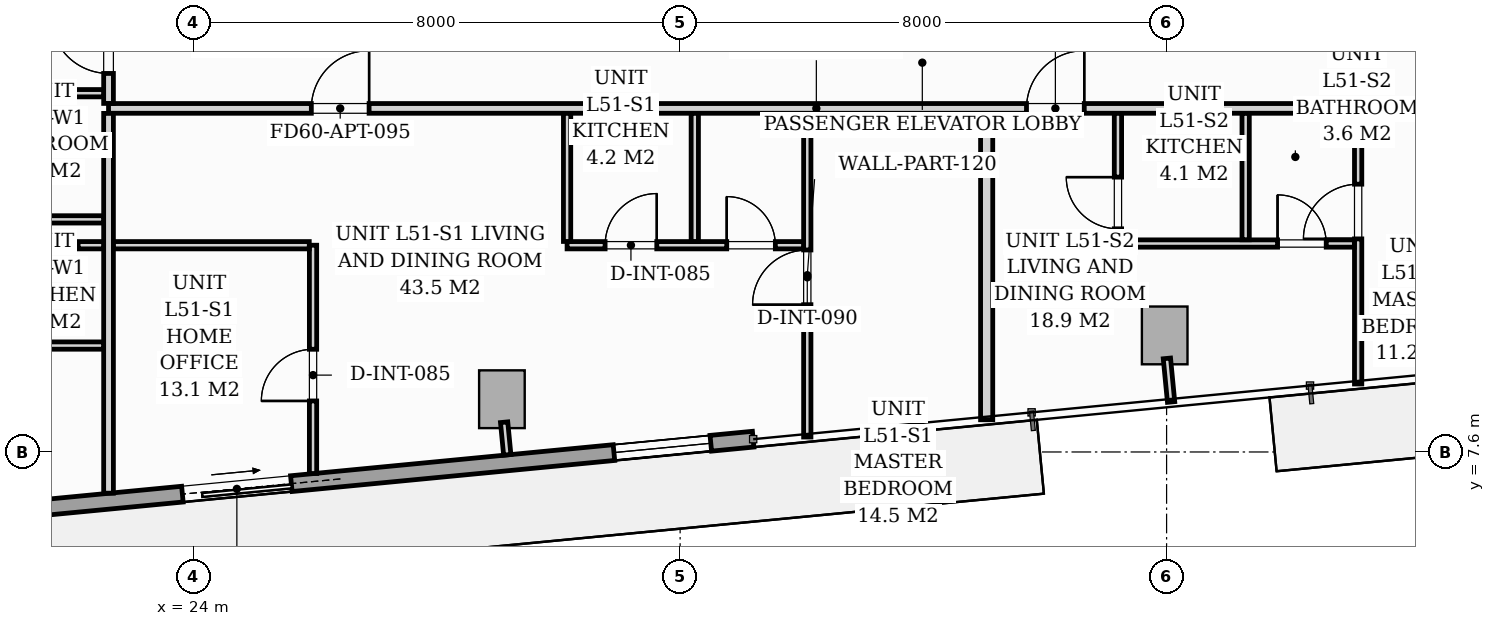
"""IFC4 building model, lengths in metres.
Left out: names, types, materials, properties, quantities, classifications, styles, units other than length and angle.
Written with IfcOpenShell. Run it as: python <this file> out.ifc"""

import sys

from ifc_helpers import new_model, si_unit, direction, frame, frame_2d, origin, origin_2d, place, context, subcontext, project, spatial, rectangle, extrude, source, transform, mapped, element, fill, save


model = new_model("IFC4")
c1 = context("Model", 3, precision=1e-05, world=origin(), true_north=direction((0.0, 1.0)))
c2 = subcontext(c1, "Body", "Model", "MODEL_VIEW")
j1 = project(units=[si_unit("LENGTHUNIT", "METRE"), si_unit("PLANEANGLEUNIT", "RADIAN")], contexts=[c1])
p1 = place(None, origin())
s1 = spatial("IfcSite", under=j1, at=p1, CompositionType="ELEMENT")
p2 = place(p1, origin())
s2 = spatial("IfcBuilding", under=s1, at=p2, CompositionType="ELEMENT")
p3 = place(p2, frame((0.0, 0.0, 179.4)))
s3 = spatial("IfcBuildingStorey", under=s2, at=p3, CompositionType="ELEMENT", Elevation=179.4)
m1 = source(origin(), c2, "Body", "SweptSolid", [
    extrude(rectangle(XDim=0.75, YDim=0.95, at=origin_2d()), origin(), (0.0, 0.0, 1.0), 3.196),
])
for number, where, z_axis, x_axis in (
    (1, (29.069, 8.467, 0.002), (0.0, 0.0, 1.0), (0.995, 0.096, 0.0)),
    (2, (39.969, 9.517, 0.002), (0.0, 0.0, 1.0), (0.995, 0.096, 0.0)),
):
    element("IfcColumn", number, at=place(p3, frame(where, z_axis=z_axis, x_axis=x_axis)), inside=s3, PredefinedType="COLUMN", context=c2, shape_type="MappedRepresentation", body=[
        mapped(m1, transform((0.0, 0.0, 0.0), scale=1.0)),
    ])
p4 = place(p3, frame((33.201, 7.81, 0.0), z_axis=(0.0, 0.0, 1.0), x_axis=(-0.995397074604, -0.095836652014, 0.0)))
e3 = element("IfcWall", 3, at=p4, inside=s3, PredefinedType="STANDARD", context=c2, shape_type="SweptSolid", body=[
    extrude(rectangle(XDim=16.1, YDim=0.26, at=frame_2d((8.05, 0.0))), origin(), (0.0, 0.0, 1.0), 2.94),
])
p5 = place(p4, frame((7.63, 0.0, 0.0)))
e4 = element("IfcOpeningElement", 4, at=p5, cuts=e3, PredefinedType="OPENING", context=c2, shape_type="SweptSolid", body=[
    extrude(rectangle(XDim=1.8, YDim=2.06, at=frame_2d((0.9, 1.03))), frame((0.0, 0.14, 0.0), z_axis=(0.0, -1.0, 0.0), x_axis=(1.0, 0.0, 0.0)), (0.0, 0.0, 1.0), 0.28),
])
p6 = place(p4, frame((0.7, 0.0, 0.65)))
e5 = element("IfcOpeningElement", 5, at=p6, cuts=e3, PredefinedType="OPENING", context=c2, shape_type="SweptSolid", body=[
    extrude(rectangle(XDim=1.6, YDim=1.5, at=frame_2d((0.8, 0.75))), frame((0.0, 0.14, 0.0), z_axis=(0.0, -1.0, 0.0), x_axis=(1.0, 0.0, 0.0)), (0.0, 0.0, 1.0), 0.28),
])
p7 = place(p3, frame((22.6, 13.25, 0.0), z_axis=(0.0, 0.0, 1.0), x_axis=(1.0, 0.0, 0.0)))
e6 = element("IfcWall", 6, at=p7, inside=s3, PredefinedType="PARTITIONING", context=c2, shape_type="SweptSolid", body=[
    extrude(rectangle(XDim=23.28, YDim=0.16, at=frame_2d((11.64, 0.0))), origin(), (0.0, 0.0, 1.0), 2.94),
])
p8 = place(p7, frame((3.335, 0.0, 0.0)))
e7 = element("IfcOpeningElement", 7, at=p8, cuts=e6, PredefinedType="OPENING", context=c2, shape_type="SweptSolid", body=[
    extrude(rectangle(XDim=0.95, YDim=2.06, at=frame_2d((0.475, 1.03))), frame((0.0, 0.09, 0.0), z_axis=(0.0, -1.0, 0.0), x_axis=(1.0, 0.0, 0.0)), (0.0, 0.0, 1.0), 0.18),
])
p9 = place(p7, frame((15.096, 0.0, 0.0)))
e8 = element("IfcOpeningElement", 8, at=p9, cuts=e6, PredefinedType="OPENING", context=c2, shape_type="SweptSolid", body=[
    extrude(rectangle(XDim=0.95, YDim=2.06, at=frame_2d((0.475, 1.03))), frame((0.0, 0.09, 0.0), z_axis=(0.0, -1.0, 0.0), x_axis=(1.0, 0.0, 0.0)), (0.0, 0.0, 1.0), 0.18),
])
p10 = place(p3, frame((22.6, 6.922, 0.0), z_axis=(0.0, 0.0, 1.0), x_axis=(0.0, 1.0, 0.0)))
e9 = element("IfcWall", 9, at=p10, inside=s3, PredefinedType="PARTITIONING", context=c2, shape_type="SweptSolid", body=[
    extrude(rectangle(XDim=6.246, YDim=0.16, at=frame_2d((3.123, 0.0))), origin(), (0.0, 0.0, 1.0), 2.94),
])
p11 = place(p3, frame((22.6, 13.332, 0.0), z_axis=(0.0, 0.0, 1.0), x_axis=(0.0, 1.0, 0.0)))
e10 = element("IfcWall", 10, at=p11, inside=s3, PredefinedType="PARTITIONING", context=c2, shape_type="SweptSolid", body=[
    extrude(rectangle(XDim=11.549, YDim=0.16, at=frame_2d((5.774, 0.0))), origin(), (0.0, 0.0, 1.0), 2.94),
])
p12 = place(p11, frame((0.493, 0.0, 0.0)))
e11 = element("IfcOpeningElement", 11, at=p12, cuts=e10, PredefinedType="OPENING", context=c2, shape_type="SweptSolid", body=[
    extrude(rectangle(XDim=0.95, YDim=2.06, at=frame_2d((0.475, 1.03))), frame((0.0, 0.09, 0.0), z_axis=(0.0, -1.0, 0.0), x_axis=(1.0, 0.0, 0.0)), (0.0, 0.0, 1.0), 0.18),
])
p13 = place(p11, frame((4.713, 0.0, 0.0)))
e12 = element("IfcOpeningElement", 12, at=p13, cuts=e10, PredefinedType="OPENING", context=c2, shape_type="SweptSolid", body=[
    extrude(rectangle(XDim=0.95, YDim=2.06, at=frame_2d((0.475, 1.03))), frame((0.0, 0.09, 0.0), z_axis=(0.0, -1.0, 0.0), x_axis=(1.0, 0.0, 0.0)), (0.0, 0.0, 1.0), 0.18),
])
p14 = place(p3, frame((34.091, 7.846, 0.0), z_axis=(0.0, 0.0, 1.0), x_axis=(0.0, 1.0, 0.0)))
e13 = element("IfcWall", 13, at=p14, inside=s3, PredefinedType="PARTITIONING", context=c2, shape_type="SweptSolid", body=[
    extrude(rectangle(XDim=5.322, YDim=0.12, at=frame_2d((2.661, 0.0))), origin(), (0.0, 0.0, 1.0), 2.94),
])
p15 = place(p14, frame((2.176, 0.0, 0.0)))
e14 = element("IfcOpeningElement", 14, at=p15, cuts=e13, PredefinedType="OPENING", context=c2, shape_type="SweptSolid", body=[
    extrude(rectangle(XDim=0.9, YDim=2.05, at=frame_2d((0.45, 1.025))), frame((0.0, 0.07, 0.0), z_axis=(0.0, -1.0, 0.0), x_axis=(1.0, 0.0, 0.0)), (0.0, 0.0, 1.0), 0.14),
])
p16 = place(p3, frame((30.141, 11.0, 0.0), z_axis=(0.0, 0.0, 1.0), x_axis=(1.0, 0.0, 0.0)))
e15 = element("IfcWall", 15, at=p16, inside=s3, PredefinedType="PARTITIONING", context=c2, shape_type="SweptSolid", body=[
    extrude(rectangle(XDim=3.888, YDim=0.12, at=frame_2d((1.944, 0.0))), origin(), (0.0, 0.0, 1.0), 2.94),
])
p17 = place(p16, frame((0.625, 0.0, 0.0)))
e16 = element("IfcOpeningElement", 16, at=p17, cuts=e15, PredefinedType="OPENING", context=c2, shape_type="SweptSolid", body=[
    extrude(rectangle(XDim=0.85, YDim=2.05, at=frame_2d((0.425, 1.025))), frame((0.0, 0.07, 0.0), z_axis=(0.0, -1.0, 0.0), x_axis=(1.0, 0.0, 0.0)), (0.0, 0.0, 1.0), 0.14),
])
p18 = place(p16, frame((2.625, 0.0, 0.0)))
e17 = element("IfcOpeningElement", 17, at=p18, cuts=e15, PredefinedType="OPENING", context=c2, shape_type="SweptSolid", body=[
    extrude(rectangle(XDim=0.8, YDim=2.02, at=frame_2d((0.4, 1.01))), frame((0.0, 0.07, 0.0), z_axis=(0.0, -1.0, 0.0), x_axis=(1.0, 0.0, 0.0)), (0.0, 0.0, 1.0), 0.14),
])
for number, where, z_axis, x_axis in (
    (18, (32.241, 11.062, 0.0), (0.0, 0.0, 1.0), (0.0, 1.0, 0.0)),
    (19, (30.141, 11.062, 0.0), (0.0, 0.0, 1.0), (0.0, 1.0, 0.0)),
):
    element("IfcWall", number, at=place(p3, frame(where, z_axis=z_axis, x_axis=x_axis)), inside=s3, PredefinedType="PARTITIONING", context=c2, shape_type="SweptSolid", body=[
        extrude(rectangle(XDim=2.106, YDim=0.12, at=frame_2d((1.053, 0.0))), origin(), (0.0, 0.0, 1.0), 2.94),
    ])
p19 = place(p3, frame((25.963, 7.246, 0.0), z_axis=(0.0, 0.0, 1.0), x_axis=(0.0, 1.0, 0.0)))
e20 = element("IfcWall", 20, at=p19, inside=s3, PredefinedType="PARTITIONING", context=c2, shape_type="SweptSolid", body=[
    extrude(rectangle(XDim=3.754, YDim=0.12, at=frame_2d((1.877, 0.0))), origin(), (0.0, 0.0, 1.0), 2.94),
])
p20 = place(p19, frame((1.193, 0.0, 0.0)))
e21 = element("IfcOpeningElement", 21, at=p20, cuts=e20, PredefinedType="OPENING", context=c2, shape_type="SweptSolid", body=[
    extrude(rectangle(XDim=0.85, YDim=2.05, at=frame_2d((0.425, 1.025))), frame((0.0, 0.07, 0.0), z_axis=(0.0, -1.0, 0.0), x_axis=(1.0, 0.0, 0.0)), (0.0, 0.0, 1.0), 0.14),
])
p21 = place(p3, frame((22.1, 11.0, 0.0), z_axis=(0.0, 0.0, 1.0), x_axis=(1.0, 0.0, 0.0)))
e22 = element("IfcWall", 22, at=p21, inside=s3, PredefinedType="PARTITIONING", context=c2, shape_type="SweptSolid", body=[
    extrude(rectangle(XDim=0.418, YDim=0.12, at=frame_2d((0.209, 0.0))), origin(), (0.0, 0.0, 1.0), 2.94),
])
p22 = place(p3, frame((22.682, 11.0, 0.0), z_axis=(0.0, 0.0, 1.0), x_axis=(1.0, 0.0, 0.0)))
e23 = element("IfcWall", 23, at=p22, inside=s3, PredefinedType="PARTITIONING", context=c2, shape_type="SweptSolid", body=[
    extrude(rectangle(XDim=3.219, YDim=0.12, at=frame_2d((1.609, 0.0))), origin(), (0.0, 0.0, 1.0), 2.94),
])
p23 = place(p3, frame((37.041, 8.13, 0.0), z_axis=(0.0, 0.0, 1.0), x_axis=(0.0, 1.0, 0.0)))
e24 = element("IfcWall", 24, at=p23, inside=s3, PredefinedType="PARTITIONING", context=c2, shape_type="SweptSolid", body=[
    extrude(rectangle(XDim=5.038, YDim=0.2, at=frame_2d((2.519, 0.0))), origin(), (0.0, 0.0, 1.0), 2.94),
])
p24 = place(p3, frame((43.15, 8.718, 0.0), z_axis=(0.0, 0.0, 1.0), x_axis=(0.0, 1.0, 0.0)))
e25 = element("IfcWall", 25, at=p24, inside=s3, PredefinedType="PARTITIONING", context=c2, shape_type="SweptSolid", body=[
    extrude(rectangle(XDim=4.45, YDim=0.12, at=frame_2d((2.225, 0.0))), origin(), (0.0, 0.0, 1.0), 2.94),
])
p25 = place(p24, frame((2.386, 0.0, 0.0)))
e26 = element("IfcOpeningElement", 26, at=p25, cuts=e25, PredefinedType="OPENING", context=c2, shape_type="SweptSolid", body=[
    extrude(rectangle(XDim=0.9, YDim=2.05, at=frame_2d((0.45, 1.025))), frame((0.0, 0.07, 0.0), z_axis=(0.0, -1.0, 0.0), x_axis=(1.0, 0.0, 0.0)), (0.0, 0.0, 1.0), 0.14),
])
p26 = place(p3, frame((39.2, 11.028, 0.0), z_axis=(0.0, 0.0, 1.0), x_axis=(1.0, 0.0, 0.0)))
e27 = element("IfcWall", 27, at=p26, inside=s3, PredefinedType="PARTITIONING", context=c2, shape_type="SweptSolid", body=[
    extrude(rectangle(XDim=3.888, YDim=0.12, at=frame_2d((1.944, 0.0))), origin(), (0.0, 0.0, 1.0), 2.94),
])
p27 = place(p26, frame((2.625, 0.0, 0.0)))
e28 = element("IfcOpeningElement", 28, at=p27, cuts=e27, PredefinedType="OPENING", context=c2, shape_type="SweptSolid", body=[
    extrude(rectangle(XDim=0.8, YDim=2.02, at=frame_2d((0.4, 1.01))), frame((0.0, 0.07, 0.0), z_axis=(0.0, -1.0, 0.0), x_axis=(1.0, 0.0, 0.0)), (0.0, 0.0, 1.0), 0.14),
])
p28 = place(p3, frame((41.3, 11.09, 0.0), z_axis=(0.0, 0.0, 1.0), x_axis=(0.0, 1.0, 0.0)))
e29 = element("IfcWall", 29, at=p28, inside=s3, PredefinedType="PARTITIONING", context=c2, shape_type="SweptSolid", body=[
    extrude(rectangle(XDim=2.078, YDim=0.12, at=frame_2d((1.039, 0.0))), origin(), (0.0, 0.0, 1.0), 2.94),
])
p29 = place(p3, frame((39.2, 11.09, 0.0), z_axis=(0.0, 0.0, 1.0), x_axis=(0.0, 1.0, 0.0)))
e30 = element("IfcWall", 30, at=p29, inside=s3, PredefinedType="PARTITIONING", context=c2, shape_type="SweptSolid", body=[
    extrude(rectangle(XDim=2.078, YDim=0.12, at=frame_2d((1.039, 0.0))), origin(), (0.0, 0.0, 1.0), 2.94),
])
p30 = place(p29, frame((0.18, 0.0, 0.0)))
e31 = element("IfcOpeningElement", 31, at=p30, cuts=e30, PredefinedType="OPENING", context=c2, shape_type="SweptSolid", body=[
    extrude(rectangle(XDim=0.85, YDim=2.05, at=frame_2d((0.425, 1.025))), frame((0.0, 0.07, 0.0), z_axis=(0.0, -1.0, 0.0), x_axis=(1.0, 0.0, 0.0)), (0.0, 0.0, 1.0), 0.14),
])
for number, where, z_axis, x_axis in (
    (32, (20.262, 11.425, 0.0), (0.0, 0.0, 1.0), (1.0, 0.0, 0.0)),
    (33, (20.262, 9.35, 0.0), (0.0, 0.0, 1.0), (1.0, 0.0, 0.0)),
    (34, (20.262, 13.5, 0.0), (0.0, 0.0, 1.0), (1.0, 0.0, 0.0)),
):
    element("IfcWall", number, at=place(p3, frame(where, z_axis=z_axis, x_axis=x_axis)), inside=s3, PredefinedType="PARTITIONING", context=c2, shape_type="SweptSolid", body=[
        extrude(rectangle(XDim=2.256, YDim=0.12, at=frame_2d((1.128, 0.0))), origin(), (0.0, 0.0, 1.0), 2.94),
    ])
p31 = place(p3, frame((29.105, 8.089, 0.0), z_axis=(0.0, 0.0, 1.0), x_axis=(0.095772948675, -0.995403205893, 0.0)))
e35 = element("IfcWall", 35, at=p31, inside=s3, PredefinedType="PARTITIONING", context=c2, shape_type="SweptSolid", body=[
    extrude(rectangle(XDim=0.538, YDim=0.12, at=frame_2d((0.269, 0.0))), origin(), (0.0, 0.0, 1.0), 2.94),
])
p32 = place(p3, frame((40.005, 9.139, 0.0), z_axis=(0.0, 0.0, 1.0), x_axis=(0.095977354523, -0.995383517755, 0.0)))
e36 = element("IfcWall", 36, at=p32, inside=s3, PredefinedType="PARTITIONING", context=c2, shape_type="SweptSolid", body=[
    extrude(rectangle(XDim=0.72, YDim=0.12, at=frame_2d((0.36, 0.0))), origin(), (0.0, 0.0, 1.0), 2.94),
])
m2 = source(origin(), c2, "Body", "SweptSolid", [
    extrude(rectangle(XDim=1.8, YDim=2.06, at=frame_2d((0.9, 1.03))), frame((0.0, 0.025, 0.0), z_axis=(0.0, -1.0, 0.0), x_axis=(1.0, 0.0, 0.0)), (0.0, 0.0, 1.0), 0.05),
])
p33 = place(p5, origin())
e37 = element("IfcDoor", 37, at=p33, inside=s3, OperationType="SLIDING_TO_LEFT", PredefinedType="DOOR", context=c2, shape_type="MappedRepresentation", body=[
    mapped(m2, transform((0.0, 0.0, 0.0), scale=1.0)),
])
fill(e4, e37)
m3 = source(origin(), c2, "Body", "SweptSolid", [
    extrude(rectangle(XDim=1.6, YDim=1.5, at=frame_2d((0.8, 0.75))), frame((0.0, 0.03, 0.0), z_axis=(0.0, -1.0, 0.0), x_axis=(1.0, 0.0, 0.0)), (0.0, 0.0, 1.0), 0.06),
])
p34 = place(p6, origin())
e38 = element("IfcWindow", 38, at=p34, inside=s3, PartitioningType="SINGLE_PANEL", PredefinedType="WINDOW", context=c2, shape_type="MappedRepresentation", body=[
    mapped(m3, transform((0.0, 0.0, 0.0), scale=1.0)),
])
fill(e5, e38)
m4 = source(origin(), c2, "Body", "SweptSolid", [
    extrude(rectangle(XDim=0.85, YDim=2.05, at=frame_2d((0.425, 1.025))), frame((0.0, 0.025, 0.0), z_axis=(0.0, -1.0, 0.0), x_axis=(1.0, 0.0, 0.0)), (0.0, 0.0, 1.0), 0.05),
])
p35 = place(p20, origin())
e39 = element("IfcDoor", 39, at=p35, inside=s3, OperationType="SINGLE_SWING_LEFT", PredefinedType="DOOR", context=c2, shape_type="MappedRepresentation", body=[
    mapped(m4, transform((0.0, 0.0, 0.0), scale=1.0)),
])
fill(e21, e39)
m5 = source(origin(), c2, "Body", "SweptSolid", [
    extrude(rectangle(XDim=0.95, YDim=2.06, at=frame_2d((0.475, 1.03))), frame((0.0, 0.025, 0.0), z_axis=(0.0, -1.0, 0.0), x_axis=(1.0, 0.0, 0.0)), (0.0, 0.0, 1.0), 0.05),
])
p36 = place(p8, origin())
e40 = element("IfcDoor", 40, at=p36, inside=s3, OperationType="SINGLE_SWING_RIGHT", PredefinedType="DOOR", context=c2, shape_type="MappedRepresentation", body=[
    mapped(m5, transform((0.0, 0.0, 0.0), scale=1.0)),
])
fill(e7, e40)
m6 = source(origin(), c2, "Body", "SweptSolid", [
    extrude(rectangle(XDim=0.9, YDim=2.05, at=frame_2d((0.45, 1.025))), frame((0.0, 0.025, 0.0), z_axis=(0.0, -1.0, 0.0), x_axis=(1.0, 0.0, 0.0)), (0.0, 0.0, 1.0), 0.05),
])
p37 = place(p15, origin())
e41 = element("IfcDoor", 41, at=p37, inside=s3, OperationType="SINGLE_SWING_LEFT", PredefinedType="DOOR", context=c2, shape_type="MappedRepresentation", body=[
    mapped(m6, transform((0.0, 0.0, 0.0), scale=1.0)),
])
fill(e14, e41)
p38 = place(p17, origin())
e42 = element("IfcDoor", 42, at=p38, inside=s3, OperationType="SINGLE_SWING_RIGHT", PredefinedType="DOOR", context=c2, shape_type="MappedRepresentation", body=[
    mapped(m4, transform((0.0, 0.0, 0.0), scale=1.0)),
])
fill(e16, e42)
m7 = source(origin(), c2, "Body", "SweptSolid", [
    extrude(rectangle(XDim=0.8, YDim=2.02, at=frame_2d((0.4, 1.01))), frame((0.0, 0.025, 0.0), z_axis=(0.0, -1.0, 0.0), x_axis=(1.0, 0.0, 0.0)), (0.0, 0.0, 1.0), 0.05),
])
p39 = place(p18, origin())
e43 = element("IfcDoor", 43, at=p39, inside=s3, OperationType="SINGLE_SWING_LEFT", PredefinedType="DOOR", context=c2, shape_type="MappedRepresentation", body=[
    mapped(m7, transform((0.0, 0.0, 0.0), scale=1.0)),
])
fill(e17, e43)
p40 = place(p9, origin())
e44 = element("IfcDoor", 44, at=p40, inside=s3, OperationType="SINGLE_SWING_RIGHT", PredefinedType="DOOR", context=c2, shape_type="MappedRepresentation", body=[
    mapped(m5, transform((0.0, 0.0, 0.0), scale=1.0)),
])
fill(e8, e44)
p41 = place(p25, origin())
e45 = element("IfcDoor", 45, at=p41, inside=s3, OperationType="SINGLE_SWING_LEFT", PredefinedType="DOOR", context=c2, shape_type="MappedRepresentation", body=[
    mapped(m6, transform((0.0, 0.0, 0.0), scale=1.0)),
])
fill(e26, e45)
p42 = place(p30, origin())
e46 = element("IfcDoor", 46, at=p42, inside=s3, OperationType="SINGLE_SWING_RIGHT", PredefinedType="DOOR", context=c2, shape_type="MappedRepresentation", body=[
    mapped(m4, transform((0.0, 0.0, 0.0), scale=1.0)),
])
fill(e31, e46)
p43 = place(p27, origin())
e47 = element("IfcDoor", 47, at=p43, inside=s3, OperationType="SINGLE_SWING_LEFT", PredefinedType="DOOR", context=c2, shape_type="MappedRepresentation", body=[
    mapped(m7, transform((0.0, 0.0, 0.0), scale=1.0)),
])
fill(e28, e47)
p44 = place(p12, origin())
e48 = element("IfcDoor", 48, at=p44, inside=s3, OperationType="SINGLE_SWING_RIGHT", PredefinedType="DOOR", context=c2, shape_type="MappedRepresentation", body=[
    mapped(m5, transform((0.0, 0.0, 0.0), scale=1.0)),
])
fill(e11, e48)
save(model, sys.argv[1])
